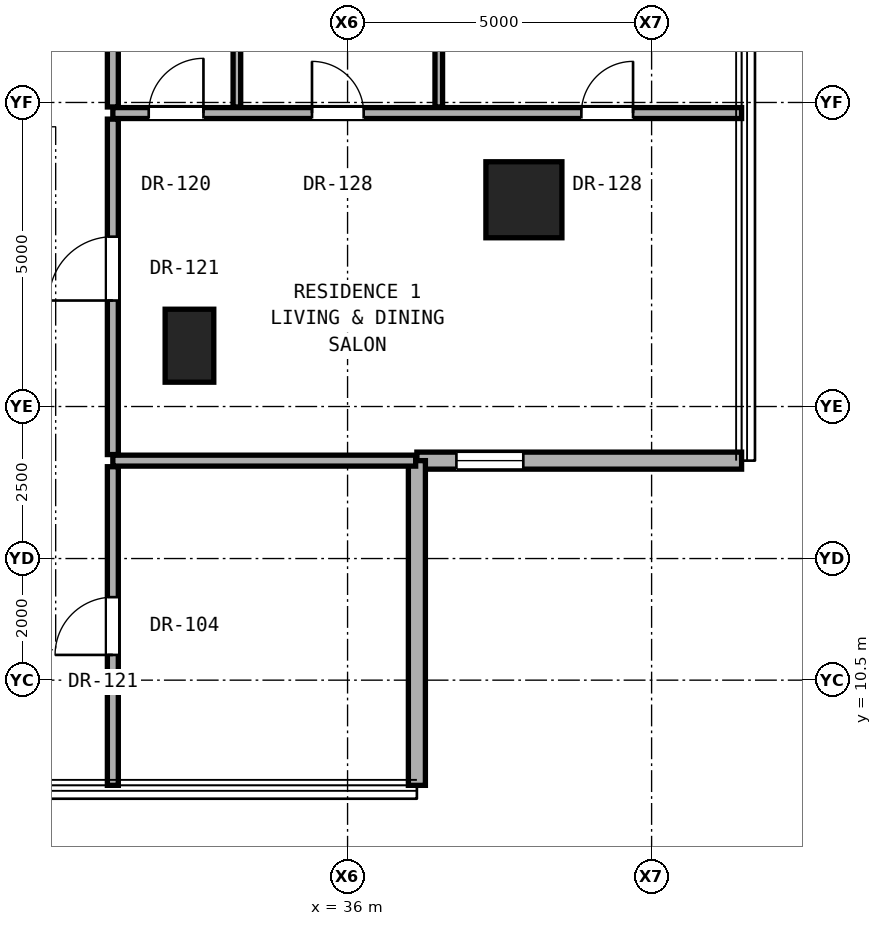
"""IFC4 building model, lengths in metres.
Left out: names, types, materials, properties, quantities, classifications, styles, units other than length and angle.
Written with IfcOpenShell. Run it as: python <this file> out.ifc"""

import sys

from ifc_helpers import new_model, si_unit, direction, frame, frame_2d, origin, origin_2d, place, context, subcontext, project, spatial, rectangle, hollow_rectangle, extrude, element, fill, save


model = new_model("IFC4")
c1 = context("Model", 3, precision=1e-05, world=origin(), true_north=direction((0.0, 1.0)))
c2 = subcontext(c1, "Body", "Model", "MODEL_VIEW")
j1 = project(units=[si_unit("LENGTHUNIT", "METRE"), si_unit("PLANEANGLEUNIT", "RADIAN")], contexts=[c1])
p1 = place(None, origin())
s1 = spatial("IfcSite", under=j1, at=p1, CompositionType="ELEMENT")
p2 = place(p1, origin())
s2 = spatial("IfcBuilding", under=s1, at=p2, CompositionType="ELEMENT")
p3 = place(p2, frame((0.0, 0.0, 68.6)))
s3 = spatial("IfcBuildingStorey", under=s2, at=p3, CompositionType="ELEMENT", Elevation=68.6)
p4 = place(p3, frame((38.9, 18.4, 0.0), z_axis=(0.0, 0.0, 1.0), x_axis=(1.0, 0.0, 0.0)))
e1 = element("IfcColumn", 1, at=p4, inside=s3, PredefinedType="COLUMN", context=c2, shape_type="SweptSolid", body=[
    extrude(hollow_rectangle(XDim=1.25, YDim=1.25, WallThickness=0.07, at=origin_2d()), origin(), (0.0, 0.0, 1.0), 3.3),
])
p5 = place(p3, frame((33.4, 16.0, 0.0), z_axis=(0.0, 0.0, 1.0), x_axis=(1.0, 0.0, 0.0)))
e2 = element("IfcColumn", 2, at=p5, inside=s3, PredefinedType="PILASTER", context=c2, shape_type="SweptSolid", body=[
    extrude(rectangle(XDim=0.8, YDim=1.2, at=origin_2d()), origin(), (0.0, 0.0, 1.0), 3.3),
])
p6 = place(p3, frame((37.14, 14.11, 0.0), z_axis=(0.0, 0.0, 1.0), x_axis=(1.0, 0.0, 0.0)))
e3 = element("IfcWall", 3, at=p6, inside=s3, PredefinedType="SOLIDWALL", context=c2, shape_type="SweptSolid", body=[
    extrude(rectangle(XDim=5.34, YDim=0.28, at=frame_2d((2.67, 0.0))), origin(), (0.0, 0.0, 1.0), 3.04),
])
p7 = place(p6, frame((0.65, 0.0, 0.85)))
e4 = element("IfcOpeningElement", 4, at=p7, cuts=e3, PredefinedType="OPENING", context=c2, shape_type="SweptSolid", body=[
    extrude(rectangle(XDim=1.1, YDim=2.0, at=frame_2d((0.55, 1.0))), frame((0.0, 0.15, 0.0), z_axis=(0.0, -1.0, 0.0), x_axis=(1.0, 0.0, 0.0)), (0.0, 0.0, 1.0), 0.3),
])
p8 = place(p3, frame((37.14, 8.77, 0.0), z_axis=(0.0, 0.0, 1.0), x_axis=(0.0, 1.0, 0.0)))
e5 = element("IfcWall", 5, at=p8, inside=s3, PredefinedType="SOLIDWALL", context=c2, shape_type="SweptSolid", body=[
    extrude(rectangle(XDim=5.34, YDim=0.28, at=frame_2d((2.67, 0.0))), origin(), (0.0, 0.0, 1.0), 3.04),
])
p9 = place(p3, frame((32.14, 14.11, 0.0), z_axis=(0.0, 0.0, 1.0), x_axis=(1.0, 0.0, 0.0)))
e6 = element("IfcWall", 6, at=p9, inside=s3, PredefinedType="PARTITIONING", context=c2, shape_type="SweptSolid", body=[
    extrude(rectangle(XDim=4.98, YDim=0.18, at=frame_2d((2.49, 0.0))), origin(), (0.0, 0.0, 1.0), 3.06),
])
p10 = place(p3, frame((32.14, 19.826, 0.0), z_axis=(0.0, 0.0, 1.0), x_axis=(1.0, 0.0, 0.0)))
e7 = element("IfcWall", 7, at=p10, inside=s3, PredefinedType="PARTITIONING", context=c2, shape_type="SweptSolid", body=[
    extrude(rectangle(XDim=10.34, YDim=0.18, at=frame_2d((5.17, 0.0))), origin(), (0.0, 0.0, 1.0), 2.125),
])
p11 = place(p10, frame((7.705, 0.0, 0.0)))
e8 = element("IfcOpeningElement", 8, at=p11, cuts=e7, PredefinedType="OPENING", context=c2, shape_type="SweptSolid", body=[
    extrude(rectangle(XDim=0.85, YDim=2.01, at=frame_2d((0.425, 1.005))), frame((0.0, 0.1, 0.0), z_axis=(0.0, -1.0, 0.0), x_axis=(1.0, 0.0, 0.0)), (0.0, 0.0, 1.0), 0.2),
])
p12 = place(p10, frame((3.275, 0.0, 0.0)))
e9 = element("IfcOpeningElement", 9, at=p12, cuts=e7, PredefinedType="OPENING", context=c2, shape_type="SweptSolid", body=[
    extrude(rectangle(XDim=0.85, YDim=2.01, at=frame_2d((0.425, 1.005))), frame((0.0, 0.1, 0.0), z_axis=(0.0, -1.0, 0.0), x_axis=(1.0, 0.0, 0.0)), (0.0, 0.0, 1.0), 0.2),
])
p13 = place(p10, frame((0.59, 0.0, 0.0)))
e10 = element("IfcOpeningElement", 10, at=p13, cuts=e7, PredefinedType="OPENING", context=c2, shape_type="SweptSolid", body=[
    extrude(rectangle(XDim=0.9, YDim=2.1, at=frame_2d((0.45, 1.05))), frame((0.0, 0.1, 0.0), z_axis=(0.0, -1.0, 0.0), x_axis=(1.0, 0.0, 0.0)), (0.0, 0.0, 1.0), 0.2),
])
p14 = place(p3, frame((32.14, 8.77, 0.0), z_axis=(0.0, 0.0, 1.0), x_axis=(0.0, 1.0, 0.0)))
e11 = element("IfcWall", 11, at=p14, inside=s3, PredefinedType="PARTITIONING", context=c2, shape_type="SweptSolid", body=[
    extrude(rectangle(XDim=5.24, YDim=0.18, at=frame_2d((2.62, 0.0))), origin(), (0.0, 0.0, 1.0), 3.06),
])
p15 = place(p14, frame((2.145, 0.0, 0.0)))
e12 = element("IfcOpeningElement", 12, at=p15, cuts=e11, PredefinedType="OPENING", context=c2, shape_type="SweptSolid", body=[
    extrude(rectangle(XDim=0.95, YDim=2.15, at=frame_2d((0.475, 1.075))), frame((0.0, 0.1, 0.0), z_axis=(0.0, -1.0, 0.0), x_axis=(1.0, 0.0, 0.0)), (0.0, 0.0, 1.0), 0.2),
])
p16 = place(p3, frame((32.14, 14.21, 0.0), z_axis=(0.0, 0.0, 1.0), x_axis=(0.0, 1.0, 0.0)))
e13 = element("IfcWall", 13, at=p16, inside=s3, PredefinedType="PARTITIONING", context=c2, shape_type="SweptSolid", body=[
    extrude(rectangle(XDim=5.516, YDim=0.18, at=frame_2d((2.758, 0.0))), origin(), (0.0, 0.0, 1.0), 2.436),
])
p17 = place(p16, frame((2.533, 0.0, 0.0)))
e14 = element("IfcOpeningElement", 14, at=p17, cuts=e13, PredefinedType="OPENING", context=c2, shape_type="SweptSolid", body=[
    extrude(rectangle(XDim=1.05, YDim=2.2, at=frame_2d((0.525, 1.1))), frame((0.0, 0.1, 0.0), z_axis=(0.0, -1.0, 0.0), x_axis=(1.0, 0.0, 0.0)), (0.0, 0.0, 1.0), 0.2),
])
p18 = place(p3, frame((32.14, 19.926, 0.0), z_axis=(0.0, 0.0, 1.0), x_axis=(0.0, 1.0, 0.0)))
e15 = element("IfcWall", 15, at=p18, inside=s3, PredefinedType="PARTITIONING", context=c2, shape_type="SweptSolid", body=[
    extrude(rectangle(XDim=2.52, YDim=0.18, at=frame_2d((1.26, 0.0))), origin(), (0.0, 0.0, 1.0), 3.06),
])
for number, where, z_axis, x_axis in (
    (16, (34.18, 19.926, 0.0), (0.0, 0.0, 1.0), (0.0, 1.0, 0.0)),
    (17, (37.5, 19.926, 0.0), (0.0, 0.0, 1.0), (0.0, 1.0, 0.0)),
):
    element("IfcWall", number, at=place(p3, frame(where, z_axis=z_axis, x_axis=x_axis)), inside=s3, PredefinedType="PARTITIONING", context=c2, shape_type="SweptSolid", body=[
        extrude(rectangle(XDim=2.52, YDim=0.125, at=frame_2d((1.26, 0.0))), origin(), (0.0, 0.0, 1.0), 3.06),
    ])
p19 = place(p7, origin())
e18 = element("IfcWindow", 18, at=p19, inside=s3, PartitioningType="SINGLE_PANEL", PredefinedType="WINDOW", context=c2, shape_type="SweptSolid", body=[
    extrude(rectangle(XDim=1.1, YDim=2.0, at=frame_2d((0.55, 1.0))), frame((0.0, 0.03, 0.0), z_axis=(0.0, -1.0, 0.0), x_axis=(1.0, 0.0, 0.0)), (0.0, 0.0, 1.0), 0.06),
])
fill(e4, e18)
p20 = place(p17, origin())
e19 = element("IfcDoor", 19, at=p20, inside=s3, OperationType="SINGLE_SWING_LEFT", PredefinedType="DOOR", context=c2, shape_type="SweptSolid", body=[
    extrude(rectangle(XDim=1.05, YDim=2.2, at=frame_2d((0.525, 1.1))), frame((0.0, 0.025, 0.0), z_axis=(0.0, -1.0, 0.0), x_axis=(1.0, 0.0, 0.0)), (0.0, 0.0, 1.0), 0.05),
])
fill(e14, e19)
p21 = place(p11, origin())
e20 = element("IfcDoor", 20, at=p21, inside=s3, OperationType="SINGLE_SWING_RIGHT", PredefinedType="DOOR", context=c2, shape_type="SweptSolid", body=[
    extrude(rectangle(XDim=0.85, YDim=2.01, at=frame_2d((0.425, 1.005))), frame((0.0, 0.025, 0.0), z_axis=(0.0, -1.0, 0.0), x_axis=(1.0, 0.0, 0.0)), (0.0, 0.0, 1.0), 0.05),
])
fill(e8, e20)
p22 = place(p12, origin())
e21 = element("IfcDoor", 21, at=p22, inside=s3, OperationType="SINGLE_SWING_LEFT", PredefinedType="DOOR", context=c2, shape_type="SweptSolid", body=[
    extrude(rectangle(XDim=0.85, YDim=2.01, at=frame_2d((0.425, 1.005))), frame((0.0, 0.025, 0.0), z_axis=(0.0, -1.0, 0.0), x_axis=(1.0, 0.0, 0.0)), (0.0, 0.0, 1.0), 0.05),
])
fill(e9, e21)
p23 = place(p13, origin())
e22 = element("IfcDoor", 22, at=p23, inside=s3, OperationType="SINGLE_SWING_RIGHT", PredefinedType="DOOR", context=c2, shape_type="SweptSolid", body=[
    extrude(rectangle(XDim=0.9, YDim=2.1, at=frame_2d((0.45, 1.05))), frame((0.0, 0.025, 0.0), z_axis=(0.0, -1.0, 0.0), x_axis=(1.0, 0.0, 0.0)), (0.0, 0.0, 1.0), 0.05),
])
fill(e10, e22)
p24 = place(p15, origin())
e23 = element("IfcDoor", 23, at=p24, inside=s3, OperationType="SINGLE_SWING_LEFT", PredefinedType="DOOR", context=c2, shape_type="SweptSolid", body=[
    extrude(rectangle(XDim=0.95, YDim=2.15, at=frame_2d((0.475, 1.075))), frame((0.0, 0.025, 0.0), z_axis=(0.0, -1.0, 0.0), x_axis=(1.0, 0.0, 0.0)), (0.0, 0.0, 1.0), 0.05),
])
fill(e12, e23)
save(model, sys.argv[1])
